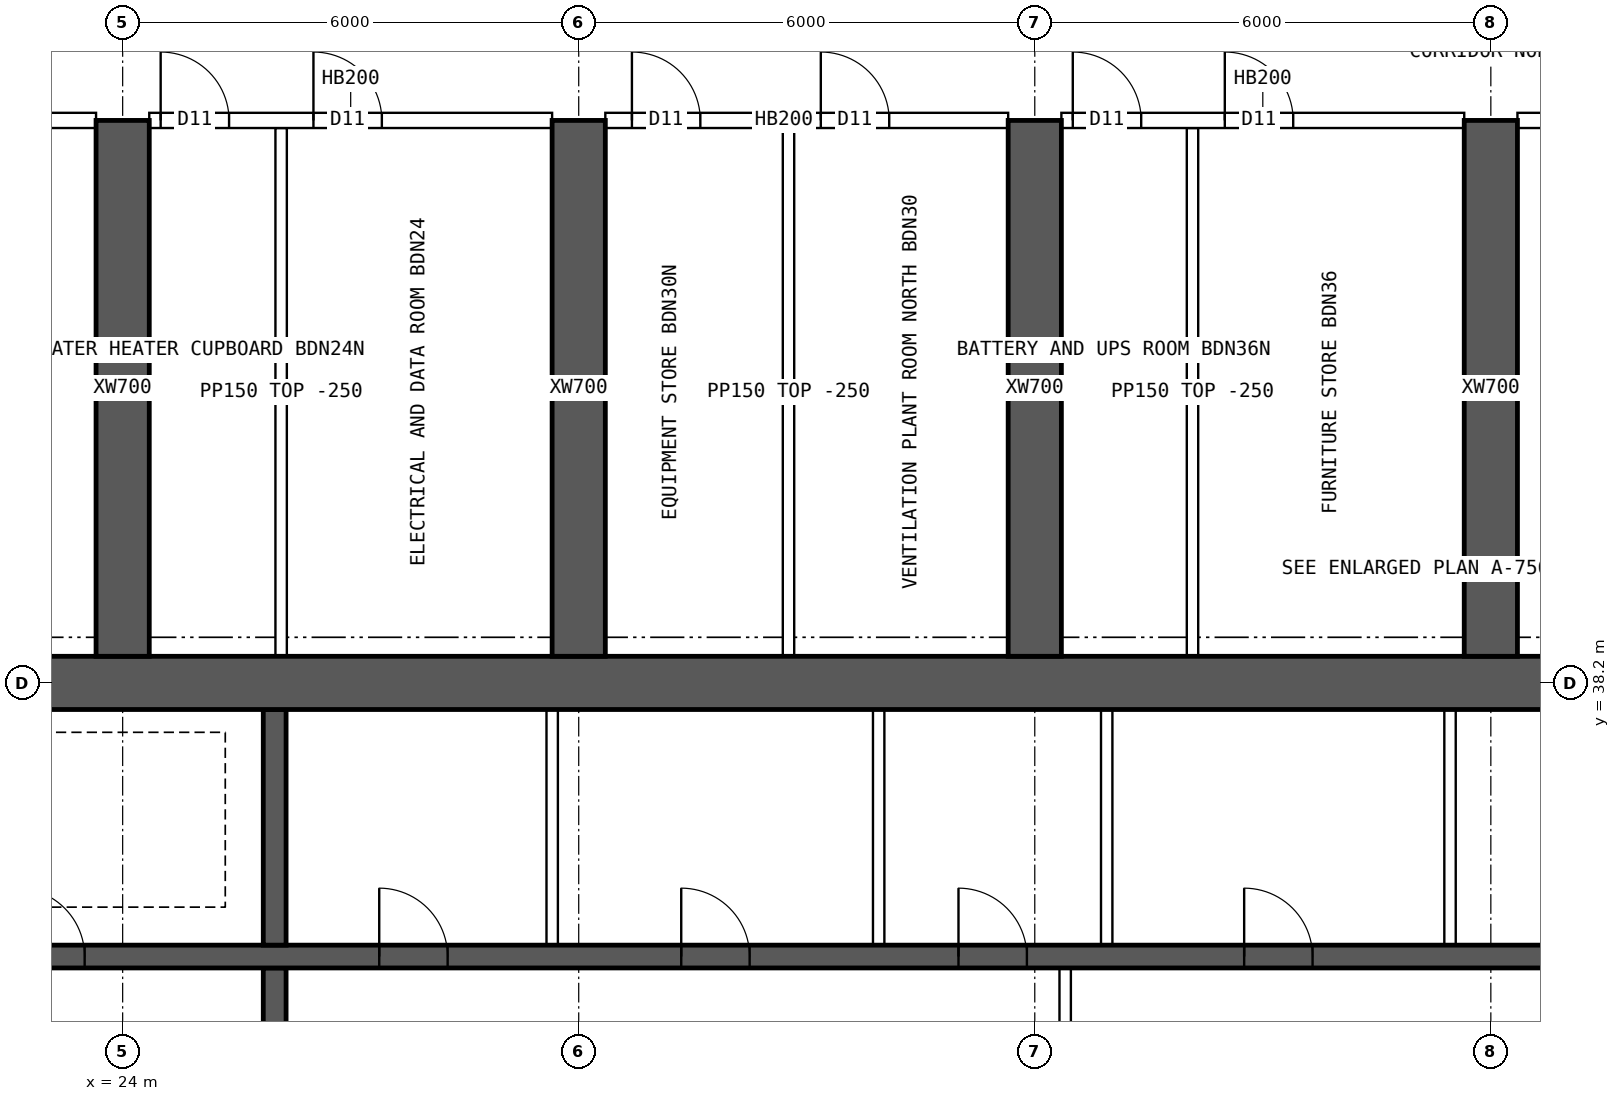
"""IFC4 building model, lengths in metres.
Left out: names, types, materials, properties, quantities, classifications, styles, units other than length and angle.
Written with IfcOpenShell. Run it as: python <this file> out.ifc"""

import sys

from ifc_helpers import new_model, si_unit, direction, frame, frame_2d, origin, place, context, subcontext, project, spatial, rectangle, extrude, element, fill, save


model = new_model("IFC4")
c1 = context("Model", 3, precision=1e-05, world=origin(), true_north=direction((0.0, 1.0)))
c2 = subcontext(c1, "Body", "Model", "MODEL_VIEW")
j1 = project(units=[si_unit("LENGTHUNIT", "METRE"), si_unit("PLANEANGLEUNIT", "RADIAN")], contexts=[c1])
p1 = place(None, origin())
s1 = spatial("IfcSite", under=j1, at=p1, CompositionType="ELEMENT")
p2 = place(p1, origin())
s2 = spatial("IfcBuilding", under=s1, at=p2, CompositionType="ELEMENT")
p3 = place(p2, frame((0.0, 0.0, 216.55)))
s3 = spatial("IfcBuildingStorey", under=s2, at=p3, CompositionType="ELEMENT", Elevation=216.55)
p4 = place(p3, frame((18.0, 38.2, 0.0), z_axis=(0.0, 0.0, 1.0), x_axis=(1.0, 0.0, 0.0)))
e1 = element("IfcWall", 1, at=p4, inside=s3, PredefinedType="SHEAR", context=c2, shape_type="SweptSolid", body=[
    extrude(rectangle(XDim=48.0, YDim=0.7, at=frame_2d((24.0, 0.0))), origin(), (0.0, 0.0, 1.0), 3.75),
])
p5 = place(p3, frame((18.35, 34.6, 0.0), z_axis=(0.0, 0.0, 1.0), x_axis=(1.0, 0.0, 0.0)))
e2 = element("IfcWall", 2, at=p5, inside=s3, PredefinedType="SHEAR", context=c2, shape_type="SweptSolid", body=[
    extrude(rectangle(XDim=47.3, YDim=0.3, at=frame_2d((23.65, 0.0))), origin(), (0.0, 0.0, 1.0), 3.75),
])
p6 = place(p5, frame((0.9, 0.0, 0.0)))
e3 = element("IfcOpeningElement", 3, at=p6, cuts=e2, PredefinedType="OPENING", context=c2, shape_type="SweptSolid", body=[
    extrude(rectangle(XDim=1.1, YDim=2.1, at=frame_2d((0.55, 1.05))), frame((0.0, 0.16, 0.0), z_axis=(0.0, -1.0, 0.0), x_axis=(1.0, 0.0, 0.0)), (0.0, 0.0, 1.0), 0.32),
])
p7 = place(p5, frame((45.3, 0.0, 0.0)))
e4 = element("IfcOpeningElement", 4, at=p7, cuts=e2, PredefinedType="OPENING", context=c2, shape_type="SweptSolid", body=[
    extrude(rectangle(XDim=1.1, YDim=2.1, at=frame_2d((0.55, 1.05))), frame((0.0, 0.16, 0.0), z_axis=(0.0, -1.0, 0.0), x_axis=(1.0, 0.0, 0.0)), (0.0, 0.0, 1.0), 0.32),
])
p8 = place(p5, frame((4.25, 0.0, 0.0)))
e5 = element("IfcOpeningElement", 5, at=p8, cuts=e2, PredefinedType="OPENING", context=c2, shape_type="SweptSolid", body=[
    extrude(rectangle(XDim=0.9, YDim=2.1, at=frame_2d((0.45, 1.05))), frame((0.0, 0.16, 0.0), z_axis=(0.0, -1.0, 0.0), x_axis=(1.0, 0.0, 0.0)), (0.0, 0.0, 1.0), 0.32),
])
p9 = place(p5, frame((42.15, 0.0, 0.0)))
e6 = element("IfcOpeningElement", 6, at=p9, cuts=e2, PredefinedType="OPENING", context=c2, shape_type="SweptSolid", body=[
    extrude(rectangle(XDim=0.9, YDim=2.1, at=frame_2d((0.45, 1.05))), frame((0.0, 0.16, 0.0), z_axis=(0.0, -1.0, 0.0), x_axis=(1.0, 0.0, 0.0)), (0.0, 0.0, 1.0), 0.32),
])
p10 = place(p5, frame((9.025, 0.0, 0.0)))
e7 = element("IfcOpeningElement", 7, at=p10, cuts=e2, PredefinedType="OPENING", context=c2, shape_type="SweptSolid", body=[
    extrude(rectangle(XDim=0.9, YDim=2.1, at=frame_2d((0.45, 1.05))), frame((0.0, 0.16, 0.0), z_axis=(0.0, -1.0, 0.0), x_axis=(1.0, 0.0, 0.0)), (0.0, 0.0, 1.0), 0.32),
])
p11 = place(p5, frame((12.999, 0.0, 0.0)))
e8 = element("IfcOpeningElement", 8, at=p11, cuts=e2, PredefinedType="OPENING", context=c2, shape_type="SweptSolid", body=[
    extrude(rectangle(XDim=0.9, YDim=2.1, at=frame_2d((0.45, 1.05))), frame((0.0, 0.16, 0.0), z_axis=(0.0, -1.0, 0.0), x_axis=(1.0, 0.0, 0.0)), (0.0, 0.0, 1.0), 0.32),
])
p12 = place(p5, frame((16.646, 0.0, 0.0)))
e9 = element("IfcOpeningElement", 9, at=p12, cuts=e2, PredefinedType="OPENING", context=c2, shape_type="SweptSolid", body=[
    extrude(rectangle(XDim=0.9, YDim=2.1, at=frame_2d((0.45, 1.05))), frame((0.0, 0.16, 0.0), z_axis=(0.0, -1.0, 0.0), x_axis=(1.0, 0.0, 0.0)), (0.0, 0.0, 1.0), 0.32),
])
p13 = place(p5, frame((20.405, 0.0, 0.0)))
e10 = element("IfcOpeningElement", 10, at=p13, cuts=e2, PredefinedType="OPENING", context=c2, shape_type="SweptSolid", body=[
    extrude(rectangle(XDim=0.9, YDim=2.1, at=frame_2d((0.45, 1.05))), frame((0.0, 0.16, 0.0), z_axis=(0.0, -1.0, 0.0), x_axis=(1.0, 0.0, 0.0)), (0.0, 0.0, 1.0), 0.32),
])
p14 = place(p5, frame((24.811, 0.0, 0.0)))
e11 = element("IfcOpeningElement", 11, at=p14, cuts=e2, PredefinedType="OPENING", context=c2, shape_type="SweptSolid", body=[
    extrude(rectangle(XDim=0.9, YDim=2.1, at=frame_2d((0.45, 1.05))), frame((0.0, 0.16, 0.0), z_axis=(0.0, -1.0, 0.0), x_axis=(1.0, 0.0, 0.0)), (0.0, 0.0, 1.0), 0.32),
])
p15 = place(p5, frame((27.608, 0.0, 0.0)))
e12 = element("IfcOpeningElement", 12, at=p15, cuts=e2, PredefinedType="OPENING", context=c2, shape_type="SweptSolid", body=[
    extrude(rectangle(XDim=0.9, YDim=2.1, at=frame_2d((0.45, 1.05))), frame((0.0, 0.16, 0.0), z_axis=(0.0, -1.0, 0.0), x_axis=(1.0, 0.0, 0.0)), (0.0, 0.0, 1.0), 0.32),
])
p16 = place(p5, frame((29.981, 0.0, 0.0)))
e13 = element("IfcOpeningElement", 13, at=p16, cuts=e2, PredefinedType="OPENING", context=c2, shape_type="SweptSolid", body=[
    extrude(rectangle(XDim=0.9, YDim=2.1, at=frame_2d((0.45, 1.05))), frame((0.0, 0.16, 0.0), z_axis=(0.0, -1.0, 0.0), x_axis=(1.0, 0.0, 0.0)), (0.0, 0.0, 1.0), 0.32),
])
p17 = place(p5, frame((33.831, 0.0, 0.0)))
e14 = element("IfcOpeningElement", 14, at=p17, cuts=e2, PredefinedType="OPENING", context=c2, shape_type="SweptSolid", body=[
    extrude(rectangle(XDim=0.9, YDim=2.1, at=frame_2d((0.45, 1.05))), frame((0.0, 0.16, 0.0), z_axis=(0.0, -1.0, 0.0), x_axis=(1.0, 0.0, 0.0)), (0.0, 0.0, 1.0), 0.32),
])
p18 = place(p5, frame((37.579, 0.0, 0.0)))
e15 = element("IfcOpeningElement", 15, at=p18, cuts=e2, PredefinedType="OPENING", context=c2, shape_type="SweptSolid", body=[
    extrude(rectangle(XDim=0.9, YDim=2.1, at=frame_2d((0.45, 1.05))), frame((0.0, 0.16, 0.0), z_axis=(0.0, -1.0, 0.0), x_axis=(1.0, 0.0, 0.0)), (0.0, 0.0, 1.0), 0.32),
])
p19 = place(p3, frame((26.0, 30.55, 0.0), z_axis=(0.0, 0.0, 1.0), x_axis=(0.0, 1.0, 0.0)))
e16 = element("IfcWall", 16, at=p19, inside=s3, PredefinedType="SHEAR", context=c2, shape_type="SweptSolid", body=[
    extrude(rectangle(XDim=3.9, YDim=0.3, at=frame_2d((1.95, 0.0))), origin(), (0.0, 0.0, 1.0), 3.75),
])
p20 = place(p19, frame((1.4, 0.0, 0.0)))
e17 = element("IfcOpeningElement", 17, at=p20, cuts=e16, PredefinedType="OPENING", context=c2, shape_type="SweptSolid", body=[
    extrude(rectangle(XDim=1.2, YDim=2.1, at=frame_2d((0.6, 1.05))), frame((0.0, 0.16, 0.0), z_axis=(0.0, -1.0, 0.0), x_axis=(1.0, 0.0, 0.0)), (0.0, 0.0, 1.0), 0.32),
])
p21 = place(p3, frame((26.0, 34.75, 0.0), z_axis=(0.0, 0.0, 1.0), x_axis=(0.0, 1.0, 0.0)))
e18 = element("IfcWall", 18, at=p21, inside=s3, PredefinedType="SHEAR", context=c2, shape_type="SweptSolid", body=[
    extrude(rectangle(XDim=3.1, YDim=0.3, at=frame_2d((1.55, 0.0))), origin(), (0.0, 0.0, 1.0), 3.75),
])
for number, where, z_axis, x_axis in (
    (19, (24.0, 38.55, 0.0), (0.0, 0.0, 1.0), (0.0, 1.0, 0.0)),
    (20, (30.0, 38.55, 0.0), (0.0, 0.0, 1.0), (0.0, 1.0, 0.0)),
    (21, (36.0, 38.55, 0.0), (0.0, 0.0, 1.0), (0.0, 1.0, 0.0)),
    (22, (42.0, 38.55, 0.0), (0.0, 0.0, 1.0), (0.0, 1.0, 0.0)),
):
    element("IfcWall", number, at=place(p3, frame(where, z_axis=z_axis, x_axis=x_axis)), inside=s3, PredefinedType="SHEAR", context=c2, shape_type="SweptSolid", body=[
        extrude(rectangle(XDim=7.05, YDim=0.7, at=frame_2d((3.525, 0.0))), origin(), (0.0, 0.0, 1.0), 3.75),
    ])
p22 = place(p3, frame((36.4, 30.55, 0.0), z_axis=(0.0, 0.0, 1.0), x_axis=(0.0, 1.0, 0.0)))
e23 = element("IfcWall", 23, at=p22, inside=s3, PredefinedType="SOLIDWALL", context=c2, shape_type="SweptSolid", body=[
    extrude(rectangle(XDim=3.9, YDim=0.15, at=frame_2d((1.95, 0.0))), origin(), (0.0, 0.0, 1.0), 3.5),
])
p23 = place(p22, frame((1.15, 0.0, 0.0)))
e24 = element("IfcOpeningElement", 24, at=p23, cuts=e23, PredefinedType="OPENING", context=c2, shape_type="SweptSolid", body=[
    extrude(rectangle(XDim=1.6, YDim=2.1, at=frame_2d((0.8, 1.05))), frame((0.0, 0.085, 0.0), z_axis=(0.0, -1.0, 0.0), x_axis=(1.0, 0.0, 0.0)), (0.0, 0.0, 1.0), 0.17),
])
for number, where, z_axis, x_axis in (
    (25, (29.651, 34.75, 0.0), (0.0, 0.0, 1.0), (0.0, 1.0, 0.0)),
    (26, (33.946, 34.75, 0.0), (0.0, 0.0, 1.0), (0.0, 1.0, 0.0)),
    (27, (36.946, 34.75, 0.0), (0.0, 0.0, 1.0), (0.0, 1.0, 0.0)),
    (28, (41.463, 34.75, 0.0), (0.0, 0.0, 1.0), (0.0, 1.0, 0.0)),
):
    element("IfcWall", number, at=place(p3, frame(where, z_axis=z_axis, x_axis=x_axis)), inside=s3, PredefinedType="SOLIDWALL", context=c2, shape_type="SweptSolid", body=[
        extrude(rectangle(XDim=3.1, YDim=0.15, at=frame_2d((1.55, 0.0))), origin(), (0.0, 0.0, 1.0), 3.5),
    ])
p24 = place(p3, frame((18.35, 45.6, 0.0), z_axis=(0.0, 0.0, 1.0), x_axis=(1.0, 0.0, 0.0)))
e29 = element("IfcWall", 29, at=p24, inside=s3, PredefinedType="SOLIDWALL", context=c2, shape_type="SweptSolid", body=[
    extrude(rectangle(XDim=5.3, YDim=0.2, at=frame_2d((2.65, 0.0))), origin(), (0.0, 0.0, 1.0), 3.5),
])
p25 = place(p24, frame((0.8, 0.0, 0.0)))
e30 = element("IfcOpeningElement", 30, at=p25, cuts=e29, PredefinedType="OPENING", context=c2, shape_type="SweptSolid", body=[
    extrude(rectangle(XDim=1.0, YDim=2.1, at=frame_2d((0.5, 1.05))), frame((0.0, 0.11, 0.0), z_axis=(0.0, -1.0, 0.0), x_axis=(1.0, 0.0, 0.0)), (0.0, 0.0, 1.0), 0.22),
])
p26 = place(p3, frame((24.35, 45.6, 0.0), z_axis=(0.0, 0.0, 1.0), x_axis=(1.0, 0.0, 0.0)))
e31 = element("IfcWall", 31, at=p26, inside=s3, PredefinedType="SOLIDWALL", context=c2, shape_type="SweptSolid", body=[
    extrude(rectangle(XDim=5.3, YDim=0.2, at=frame_2d((2.65, 0.0))), origin(), (0.0, 0.0, 1.0), 3.5),
])
p27 = place(p26, frame((0.15, 0.0, 0.0)))
e32 = element("IfcOpeningElement", 32, at=p27, cuts=e31, PredefinedType="OPENING", context=c2, shape_type="SweptSolid", body=[
    extrude(rectangle(XDim=0.9, YDim=2.1, at=frame_2d((0.45, 1.05))), frame((0.0, 0.11, 0.0), z_axis=(0.0, -1.0, 0.0), x_axis=(1.0, 0.0, 0.0)), (0.0, 0.0, 1.0), 0.22),
])
p28 = place(p26, frame((2.16, 0.0, 0.0)))
e33 = element("IfcOpeningElement", 33, at=p28, cuts=e31, PredefinedType="OPENING", context=c2, shape_type="SweptSolid", body=[
    extrude(rectangle(XDim=0.9, YDim=2.1, at=frame_2d((0.45, 1.05))), frame((0.0, 0.11, 0.0), z_axis=(0.0, -1.0, 0.0), x_axis=(1.0, 0.0, 0.0)), (0.0, 0.0, 1.0), 0.22),
])
p29 = place(p3, frame((30.35, 45.6, 0.0), z_axis=(0.0, 0.0, 1.0), x_axis=(1.0, 0.0, 0.0)))
e34 = element("IfcWall", 34, at=p29, inside=s3, PredefinedType="SOLIDWALL", context=c2, shape_type="SweptSolid", body=[
    extrude(rectangle(XDim=5.3, YDim=0.2, at=frame_2d((2.65, 0.0))), origin(), (0.0, 0.0, 1.0), 3.5),
])
p30 = place(p29, frame((0.35, 0.0, 0.0)))
e35 = element("IfcOpeningElement", 35, at=p30, cuts=e34, PredefinedType="OPENING", context=c2, shape_type="SweptSolid", body=[
    extrude(rectangle(XDim=0.9, YDim=2.1, at=frame_2d((0.45, 1.05))), frame((0.0, 0.11, 0.0), z_axis=(0.0, -1.0, 0.0), x_axis=(1.0, 0.0, 0.0)), (0.0, 0.0, 1.0), 0.22),
])
p31 = place(p29, frame((2.835, 0.0, 0.0)))
e36 = element("IfcOpeningElement", 36, at=p31, cuts=e34, PredefinedType="OPENING", context=c2, shape_type="SweptSolid", body=[
    extrude(rectangle(XDim=0.9, YDim=2.1, at=frame_2d((0.45, 1.05))), frame((0.0, 0.11, 0.0), z_axis=(0.0, -1.0, 0.0), x_axis=(1.0, 0.0, 0.0)), (0.0, 0.0, 1.0), 0.22),
])
p32 = place(p3, frame((36.35, 45.6, 0.0), z_axis=(0.0, 0.0, 1.0), x_axis=(1.0, 0.0, 0.0)))
e37 = element("IfcWall", 37, at=p32, inside=s3, PredefinedType="SOLIDWALL", context=c2, shape_type="SweptSolid", body=[
    extrude(rectangle(XDim=5.3, YDim=0.2, at=frame_2d((2.65, 0.0))), origin(), (0.0, 0.0, 1.0), 3.5),
])
p33 = place(p32, frame((0.15, 0.0, 0.0)))
e38 = element("IfcOpeningElement", 38, at=p33, cuts=e37, PredefinedType="OPENING", context=c2, shape_type="SweptSolid", body=[
    extrude(rectangle(XDim=0.9, YDim=2.1, at=frame_2d((0.45, 1.05))), frame((0.0, 0.11, 0.0), z_axis=(0.0, -1.0, 0.0), x_axis=(1.0, 0.0, 0.0)), (0.0, 0.0, 1.0), 0.22),
])
p34 = place(p32, frame((2.15, 0.0, 0.0)))
e39 = element("IfcOpeningElement", 39, at=p34, cuts=e37, PredefinedType="OPENING", context=c2, shape_type="SweptSolid", body=[
    extrude(rectangle(XDim=0.9, YDim=2.1, at=frame_2d((0.45, 1.05))), frame((0.0, 0.11, 0.0), z_axis=(0.0, -1.0, 0.0), x_axis=(1.0, 0.0, 0.0)), (0.0, 0.0, 1.0), 0.22),
])
p35 = place(p3, frame((42.35, 45.6, 0.0), z_axis=(0.0, 0.0, 1.0), x_axis=(1.0, 0.0, 0.0)))
e40 = element("IfcWall", 40, at=p35, inside=s3, PredefinedType="SOLIDWALL", context=c2, shape_type="SweptSolid", body=[
    extrude(rectangle(XDim=5.3, YDim=0.2, at=frame_2d((2.65, 0.0))), origin(), (0.0, 0.0, 1.0), 3.5),
])
p36 = place(p35, frame((0.8, 0.0, 0.0)))
e41 = element("IfcOpeningElement", 41, at=p36, cuts=e40, PredefinedType="OPENING", context=c2, shape_type="SweptSolid", body=[
    extrude(rectangle(XDim=1.0, YDim=2.1, at=frame_2d((0.5, 1.05))), frame((0.0, 0.11, 0.0), z_axis=(0.0, -1.0, 0.0), x_axis=(1.0, 0.0, 0.0)), (0.0, 0.0, 1.0), 0.22),
])
for number, where, z_axis, x_axis in (
    (42, (26.085, 38.55, 0.0), (0.0, 0.0, 1.0), (0.0, 1.0, 0.0)),
    (43, (32.76, 38.55, 0.0), (0.0, 0.0, 1.0), (0.0, 1.0, 0.0)),
    (44, (38.075, 38.55, 0.0), (0.0, 0.0, 1.0), (0.0, 1.0, 0.0)),
):
    element("IfcWall", number, at=place(p3, frame(where, z_axis=z_axis, x_axis=x_axis)), inside=s3, PredefinedType="PARTITIONING", context=c2, shape_type="SweptSolid", body=[
        extrude(rectangle(XDim=6.95, YDim=0.15, at=frame_2d((3.475, 0.0))), origin(), (0.0, 0.0, 1.0), 3.5),
    ])
p37 = place(p8, origin())
e45 = element("IfcDoor", 45, at=p37, inside=s3, OperationType="SINGLE_SWING_LEFT", PredefinedType="DOOR", context=c2, shape_type="SweptSolid", body=[
    extrude(rectangle(XDim=0.9, YDim=2.1, at=frame_2d((0.45, 1.05))), frame((0.0, 0.025, 0.0), z_axis=(0.0, -1.0, 0.0), x_axis=(1.0, 0.0, 0.0)), (0.0, 0.0, 1.0), 0.05),
])
fill(e5, e45)
p38 = place(p10, origin())
e46 = element("IfcDoor", 46, at=p38, inside=s3, OperationType="SINGLE_SWING_LEFT", PredefinedType="DOOR", context=c2, shape_type="SweptSolid", body=[
    extrude(rectangle(XDim=0.9, YDim=2.1, at=frame_2d((0.45, 1.05))), frame((0.0, 0.025, 0.0), z_axis=(0.0, -1.0, 0.0), x_axis=(1.0, 0.0, 0.0)), (0.0, 0.0, 1.0), 0.05),
])
fill(e7, e46)
p39 = place(p11, origin())
e47 = element("IfcDoor", 47, at=p39, inside=s3, OperationType="SINGLE_SWING_LEFT", PredefinedType="DOOR", context=c2, shape_type="SweptSolid", body=[
    extrude(rectangle(XDim=0.9, YDim=2.1, at=frame_2d((0.45, 1.05))), frame((0.0, 0.025, 0.0), z_axis=(0.0, -1.0, 0.0), x_axis=(1.0, 0.0, 0.0)), (0.0, 0.0, 1.0), 0.05),
])
fill(e8, e47)
p40 = place(p12, origin())
e48 = element("IfcDoor", 48, at=p40, inside=s3, OperationType="SINGLE_SWING_LEFT", PredefinedType="DOOR", context=c2, shape_type="SweptSolid", body=[
    extrude(rectangle(XDim=0.9, YDim=2.1, at=frame_2d((0.45, 1.05))), frame((0.0, 0.025, 0.0), z_axis=(0.0, -1.0, 0.0), x_axis=(1.0, 0.0, 0.0)), (0.0, 0.0, 1.0), 0.05),
])
fill(e9, e48)
p41 = place(p13, origin())
e49 = element("IfcDoor", 49, at=p41, inside=s3, OperationType="SINGLE_SWING_LEFT", PredefinedType="DOOR", context=c2, shape_type="SweptSolid", body=[
    extrude(rectangle(XDim=0.9, YDim=2.1, at=frame_2d((0.45, 1.05))), frame((0.0, 0.025, 0.0), z_axis=(0.0, -1.0, 0.0), x_axis=(1.0, 0.0, 0.0)), (0.0, 0.0, 1.0), 0.05),
])
fill(e10, e49)
p42 = place(p27, origin())
e50 = element("IfcDoor", 50, at=p42, inside=s3, OperationType="SINGLE_SWING_LEFT", PredefinedType="DOOR", context=c2, shape_type="SweptSolid", body=[
    extrude(rectangle(XDim=0.9, YDim=2.1, at=frame_2d((0.45, 1.05))), frame((0.0, 0.025, 0.0), z_axis=(0.0, -1.0, 0.0), x_axis=(1.0, 0.0, 0.0)), (0.0, 0.0, 1.0), 0.05),
])
fill(e32, e50)
p43 = place(p28, origin())
e51 = element("IfcDoor", 51, at=p43, inside=s3, OperationType="SINGLE_SWING_LEFT", PredefinedType="DOOR", context=c2, shape_type="SweptSolid", body=[
    extrude(rectangle(XDim=0.9, YDim=2.1, at=frame_2d((0.45, 1.05))), frame((0.0, 0.025, 0.0), z_axis=(0.0, -1.0, 0.0), x_axis=(1.0, 0.0, 0.0)), (0.0, 0.0, 1.0), 0.05),
])
fill(e33, e51)
p44 = place(p30, origin())
e52 = element("IfcDoor", 52, at=p44, inside=s3, OperationType="SINGLE_SWING_LEFT", PredefinedType="DOOR", context=c2, shape_type="SweptSolid", body=[
    extrude(rectangle(XDim=0.9, YDim=2.1, at=frame_2d((0.45, 1.05))), frame((0.0, 0.025, 0.0), z_axis=(0.0, -1.0, 0.0), x_axis=(1.0, 0.0, 0.0)), (0.0, 0.0, 1.0), 0.05),
])
fill(e35, e52)
p45 = place(p31, origin())
e53 = element("IfcDoor", 53, at=p45, inside=s3, OperationType="SINGLE_SWING_LEFT", PredefinedType="DOOR", context=c2, shape_type="SweptSolid", body=[
    extrude(rectangle(XDim=0.9, YDim=2.1, at=frame_2d((0.45, 1.05))), frame((0.0, 0.025, 0.0), z_axis=(0.0, -1.0, 0.0), x_axis=(1.0, 0.0, 0.0)), (0.0, 0.0, 1.0), 0.05),
])
fill(e36, e53)
p46 = place(p33, origin())
e54 = element("IfcDoor", 54, at=p46, inside=s3, OperationType="SINGLE_SWING_LEFT", PredefinedType="DOOR", context=c2, shape_type="SweptSolid", body=[
    extrude(rectangle(XDim=0.9, YDim=2.1, at=frame_2d((0.45, 1.05))), frame((0.0, 0.025, 0.0), z_axis=(0.0, -1.0, 0.0), x_axis=(1.0, 0.0, 0.0)), (0.0, 0.0, 1.0), 0.05),
])
fill(e38, e54)
p47 = place(p34, origin())
e55 = element("IfcDoor", 55, at=p47, inside=s3, OperationType="SINGLE_SWING_LEFT", PredefinedType="DOOR", context=c2, shape_type="SweptSolid", body=[
    extrude(rectangle(XDim=0.9, YDim=2.1, at=frame_2d((0.45, 1.05))), frame((0.0, 0.025, 0.0), z_axis=(0.0, -1.0, 0.0), x_axis=(1.0, 0.0, 0.0)), (0.0, 0.0, 1.0), 0.05),
])
fill(e39, e55)
save(model, sys.argv[1])
